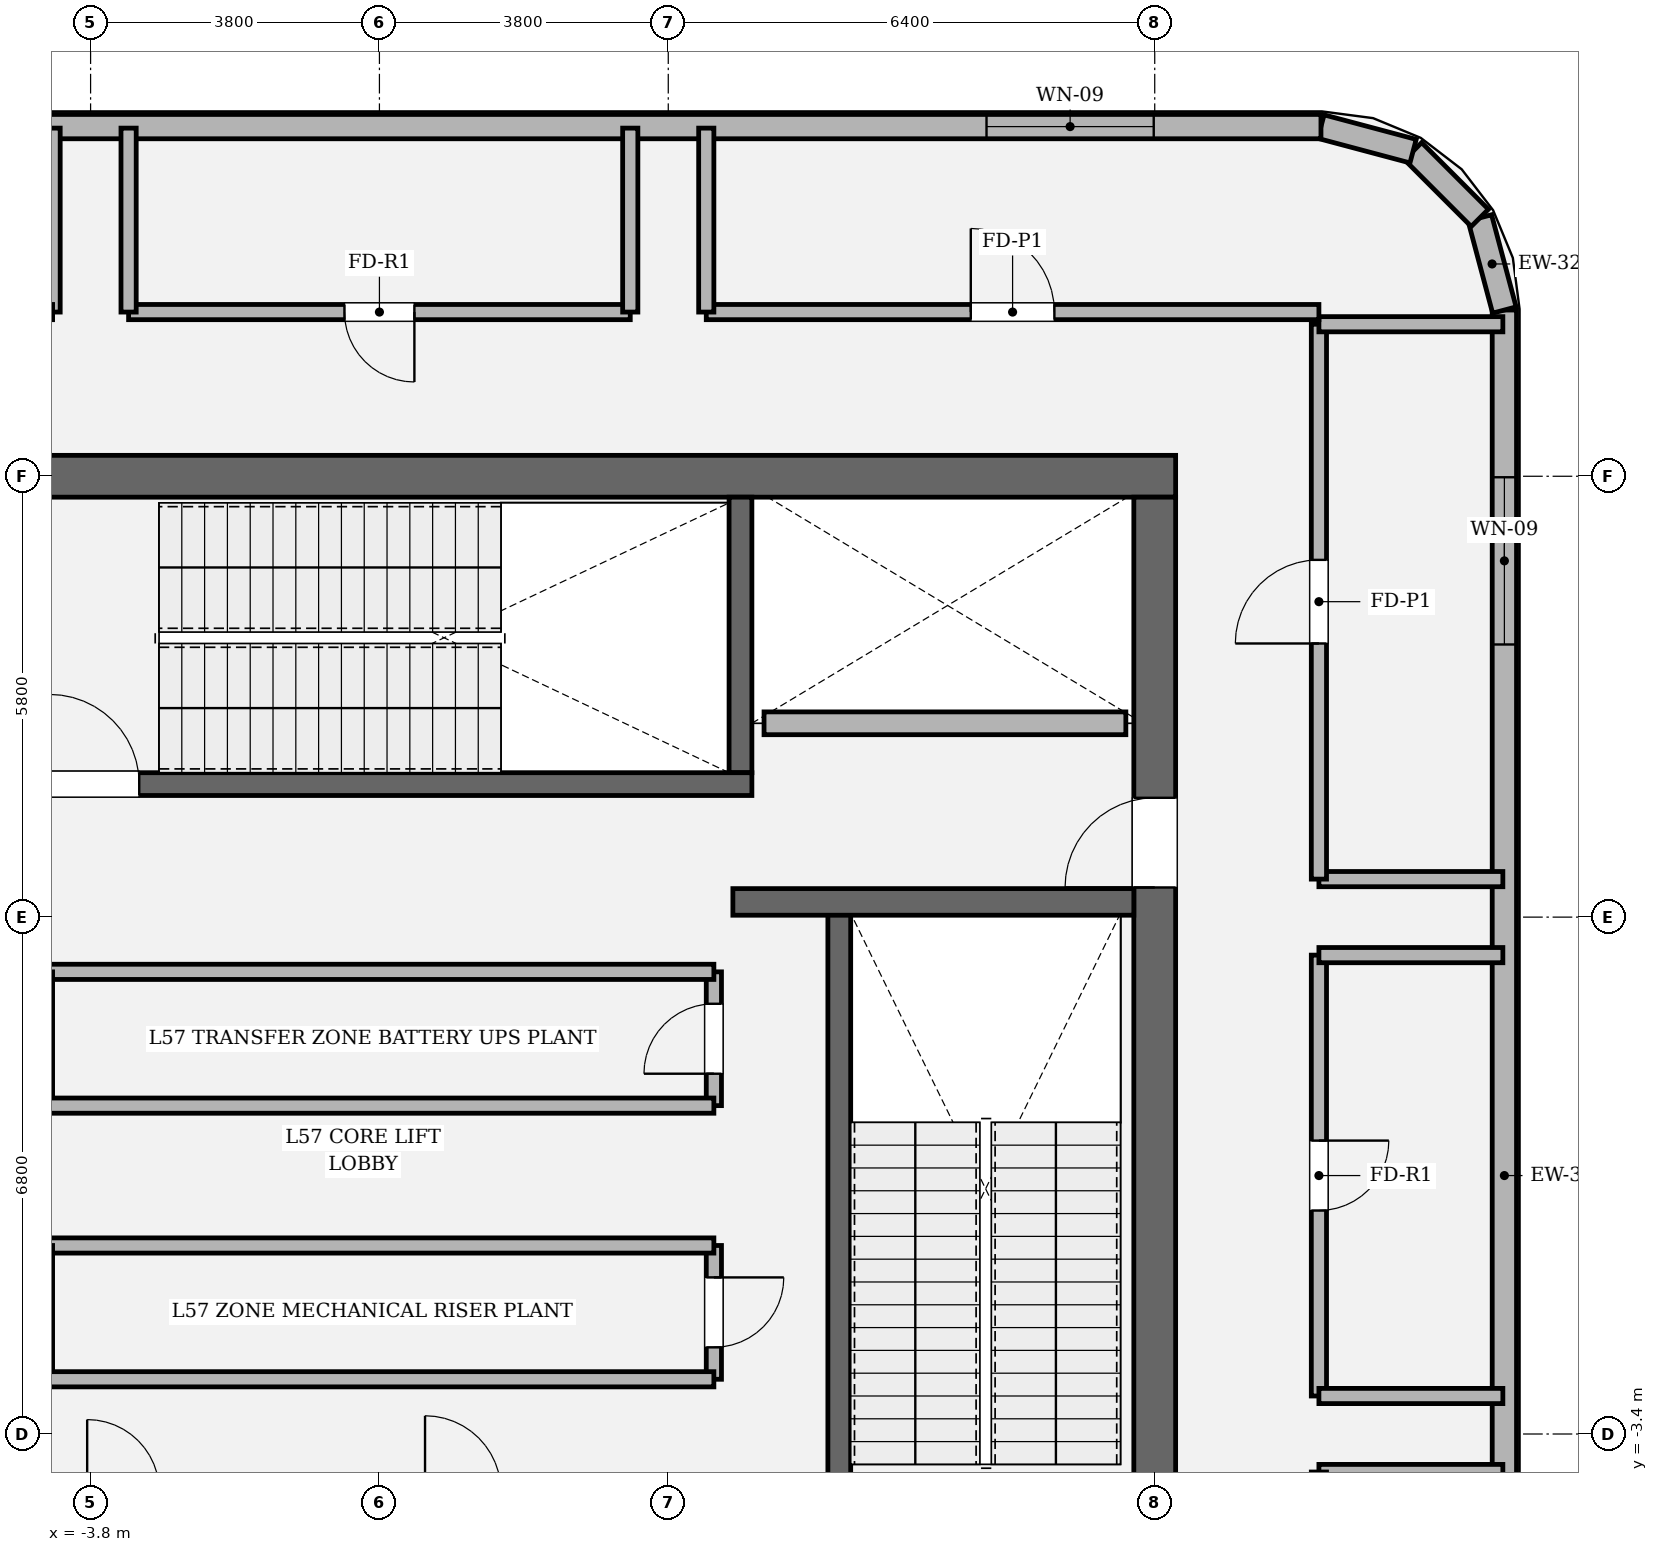
"""IFC4 building model, lengths in metres.
Left out: names, types, materials, properties, quantities, classifications, styles, units other than length and angle.
Written with IfcOpenShell. Run it as: python <this file> out.ifc"""

import sys

from ifc_helpers import new_model, si_unit, direction, frame, frame_2d, origin, place, context, subcontext, project, spatial, rectangle, extrude, element, fill, save


model = new_model("IFC4")
c1 = context("Model", 3, precision=1e-05, world=origin(), true_north=direction((0.0, 1.0)))
c2 = subcontext(c1, "Body", "Model", "MODEL_VIEW")
j1 = project(units=[si_unit("LENGTHUNIT", "METRE"), si_unit("PLANEANGLEUNIT", "RADIAN")], contexts=[c1])
p1 = place(None, origin())
s1 = spatial("IfcSite", under=j1, at=p1, CompositionType="ELEMENT")
p2 = place(p1, origin())
s2 = spatial("IfcBuilding", under=s1, at=p2, CompositionType="ELEMENT")
p3 = place(p2, frame((0.0, 0.0, 241.8)))
s3 = spatial("IfcBuildingStorey", under=s2, at=p3, CompositionType="ELEMENT", Elevation=241.8)
p4 = place(p3, frame((-10.475, 9.2, 0.0), z_axis=(0.0, 0.0, 1.0), x_axis=(1.0, 0.0, 0.0)))
e1 = element("IfcWall", 1, at=p4, inside=s3, PredefinedType="SHEAR", context=c2, shape_type="SweptSolid", body=[
    extrude(rectangle(XDim=20.95, YDim=0.55, at=frame_2d((10.475, 0.0))), origin(), (0.0, 0.0, 1.0), 4.8),
])
p5 = place(p3, frame((10.2, 8.925, 0.0), z_axis=(0.0, 0.0, 1.0), x_axis=(0.0, -1.0, 0.0)))
e2 = element("IfcWall", 2, at=p5, inside=s3, PredefinedType="SHEAR", context=c2, shape_type="SweptSolid", body=[
    extrude(rectangle(XDim=17.85, YDim=0.55, at=frame_2d((8.925, 0.0))), origin(), (0.0, 0.0, 1.0), 4.8),
])
p6 = place(p5, frame((3.955, 0.0, 0.0)))
e3 = element("IfcOpeningElement", 3, at=p6, cuts=e2, PredefinedType="OPENING", context=c2, shape_type="SweptSolid", body=[
    extrude(rectangle(XDim=1.18, YDim=2.2, at=frame_2d((0.59, 1.1))), frame((0.0, 0.285, 0.0), z_axis=(0.0, -1.0, 0.0), x_axis=(1.0, 0.0, 0.0)), (0.0, 0.0, 1.0), 0.57),
])
p7 = place(p3, frame((6.05, 3.45, 0.0), z_axis=(0.0, 0.0, 1.0), x_axis=(0.0, -1.0, 0.0)))
e4 = element("IfcWall", 4, at=p7, inside=s3, PredefinedType="SOLIDWALL", context=c2, shape_type="SweptSolid", body=[
    extrude(rectangle(XDim=8.95, YDim=0.3, at=frame_2d((4.475, 0.0))), origin(), (0.0, 0.0, 1.0), 4.8),
])
p8 = place(p3, frame((4.75, 8.925, 0.0), z_axis=(0.0, 0.0, 1.0), x_axis=(0.0, -1.0, 0.0)))
e5 = element("IfcWall", 5, at=p8, inside=s3, PredefinedType="SOLIDWALL", context=c2, shape_type="SweptSolid", body=[
    extrude(rectangle(XDim=3.625, YDim=0.3, at=frame_2d((1.812, 0.0))), origin(), (0.0, 0.0, 1.0), 4.8),
])
p9 = place(p3, frame((-4.9, 5.15, 0.0), z_axis=(0.0, 0.0, 1.0), x_axis=(1.0, 0.0, 0.0)))
e6 = element("IfcWall", 6, at=p9, inside=s3, PredefinedType="SOLIDWALL", context=c2, shape_type="SweptSolid", body=[
    extrude(rectangle(XDim=9.8, YDim=0.3, at=frame_2d((4.9, 0.0))), origin(), (0.0, 0.0, 1.0), 4.8),
])
p10 = place(p9, frame((0.56, 0.0, 0.0)))
e7 = element("IfcOpeningElement", 7, at=p10, cuts=e6, PredefinedType="OPENING", context=c2, shape_type="SweptSolid", body=[
    extrude(rectangle(XDim=1.18, YDim=2.2, at=frame_2d((0.59, 1.1))), frame((0.0, 0.16, 0.0), z_axis=(0.0, -1.0, 0.0), x_axis=(1.0, 0.0, 0.0)), (0.0, 0.0, 1.0), 0.32),
])
p11 = place(p3, frame((4.65, 3.6, 0.0), z_axis=(0.0, 0.0, 1.0), x_axis=(1.0, 0.0, 0.0)))
e8 = element("IfcWall", 8, at=p11, inside=s3, PredefinedType="SOLIDWALL", context=c2, shape_type="SweptSolid", body=[
    extrude(rectangle(XDim=5.275, YDim=0.35, at=frame_2d((2.638, 0.0))), origin(), (0.0, 0.0, 1.0), 4.8),
])
p12 = place(p3, frame((14.8, -11.387, 0.0), z_axis=(0.0, 0.0, 1.0), x_axis=(0.0, 1.0, 0.0)))
e9 = element("IfcWall", 9, at=p12, inside=s3, PredefinedType="SOLIDWALL", context=c2, shape_type="SweptSolid", body=[
    extrude(rectangle(XDim=22.774, YDim=0.32, at=frame_2d((11.387, 0.0))), origin(), (0.0, 0.0, 1.0), 3.884),
])
p13 = place(p12, frame((2.2, 0.0, 0.9)))
e10 = element("IfcOpeningElement", 10, at=p13, cuts=e9, PredefinedType="OPENING", context=c2, shape_type="SweptSolid", body=[
    extrude(rectangle(XDim=2.2, YDim=1.2, at=frame_2d((1.1, 0.6))), frame((0.0, 0.17, 0.0), z_axis=(0.0, -1.0, 0.0), x_axis=(1.0, 0.0, 0.0)), (0.0, 0.0, 1.0), 0.34),
])
p14 = place(p12, frame((18.374, 0.0, 0.9)))
e11 = element("IfcOpeningElement", 11, at=p14, cuts=e9, PredefinedType="OPENING", context=c2, shape_type="SweptSolid", body=[
    extrude(rectangle(XDim=2.2, YDim=1.2, at=frame_2d((1.1, 0.6))), frame((0.0, 0.17, 0.0), z_axis=(0.0, -1.0, 0.0), x_axis=(1.0, 0.0, 0.0)), (0.0, 0.0, 1.0), 0.34),
])
p15 = place(p3, frame((14.8, 11.387, 0.0), z_axis=(0.0, 0.0, 1.0), x_axis=(-0.25748094776, 0.966283375382, 0.0)))
e12 = element("IfcWall", 12, at=p15, inside=s3, PredefinedType="SOLIDWALL", context=c2, shape_type="SweptSolid", body=[
    extrude(rectangle(XDim=1.254, YDim=0.32, at=frame_2d((0.627, 0.0))), origin(), (0.0, 0.0, 1.0), 4.034),
])
p16 = place(p3, frame((14.477, 12.599, 0.0), z_axis=(0.0, 0.0, 1.0), x_axis=(-0.707106781187, 0.707106781187, 0.0)))
e13 = element("IfcWall", 13, at=p16, inside=s3, PredefinedType="SOLIDWALL", context=c2, shape_type="SweptSolid", body=[
    extrude(rectangle(XDim=1.242, YDim=0.32, at=frame_2d((0.621, 0.0))), origin(), (0.0, 0.0, 1.0), 4.034),
])
p17 = place(p3, frame((13.599, 13.477, 0.0), z_axis=(0.0, 0.0, 1.0), x_axis=(-0.966283375382, 0.25748094776, 0.0)))
e14 = element("IfcWall", 14, at=p17, inside=s3, PredefinedType="SOLIDWALL", context=c2, shape_type="SweptSolid", body=[
    extrude(rectangle(XDim=1.254, YDim=0.32, at=frame_2d((0.627, 0.0))), origin(), (0.0, 0.0, 1.0), 4.034),
])
p18 = place(p3, frame((12.387, 13.8, 0.0), z_axis=(0.0, 0.0, 1.0), x_axis=(-1.0, 0.0, 0.0)))
e15 = element("IfcWall", 15, at=p18, inside=s3, PredefinedType="SOLIDWALL", context=c2, shape_type="SweptSolid", body=[
    extrude(rectangle(XDim=24.774, YDim=0.32, at=frame_2d((12.387, 0.0))), origin(), (0.0, 0.0, 1.0), 3.884),
])
p19 = place(p18, frame((2.2, 0.0, 0.9)))
e16 = element("IfcOpeningElement", 16, at=p19, cuts=e15, PredefinedType="OPENING", context=c2, shape_type="SweptSolid", body=[
    extrude(rectangle(XDim=2.2, YDim=1.2, at=frame_2d((1.1, 0.6))), frame((0.0, 0.17, 0.0), z_axis=(0.0, -1.0, 0.0), x_axis=(1.0, 0.0, 0.0)), (0.0, 0.0, 1.0), 0.34),
])
p20 = place(p18, frame((20.374, 0.0, 0.9)))
e17 = element("IfcOpeningElement", 17, at=p20, cuts=e15, PredefinedType="OPENING", context=c2, shape_type="SweptSolid", body=[
    extrude(rectangle(XDim=2.2, YDim=1.2, at=frame_2d((1.1, 0.6))), frame((0.0, 0.17, 0.0), z_axis=(0.0, -1.0, 0.0), x_axis=(1.0, 0.0, 0.0)), (0.0, 0.0, 1.0), 0.34),
])
p21 = place(p3, frame((5.06, 5.95, 0.0), z_axis=(0.0, 0.0, 1.0), x_axis=(1.0, 0.0, 0.0)))
e18 = element("IfcWall", 18, at=p21, inside=s3, PredefinedType="SOLIDWALL", context=c2, shape_type="SweptSolid", body=[
    extrude(rectangle(XDim=4.76, YDim=0.3, at=frame_2d((2.38, 0.0))), origin(), (0.0, 0.0, 1.0), 4.54),
])
p22 = place(p3, frame((4.4, -2.68, 0.0), z_axis=(0.0, 0.0, 1.0), x_axis=(0.0, 1.0, 0.0)))
e19 = element("IfcWall", 19, at=p22, inside=s3, PredefinedType="SOLIDWALL", context=c2, shape_type="SweptSolid", body=[
    extrude(rectangle(XDim=1.76, YDim=0.2, at=frame_2d((0.88, 0.0))), origin(), (0.0, 0.0, 1.0), 4.54),
])
p23 = place(p22, frame((0.42, 0.0, 0.0)))
e20 = element("IfcOpeningElement", 20, at=p23, cuts=e19, PredefinedType="OPENING", context=c2, shape_type="SweptSolid", body=[
    extrude(rectangle(XDim=0.92, YDim=2.1, at=frame_2d((0.46, 1.05))), frame((0.0, 0.11, 0.0), z_axis=(0.0, -1.0, 0.0), x_axis=(1.0, 0.0, 0.0)), (0.0, 0.0, 1.0), 0.22),
])
p24 = place(p3, frame((4.4, -0.92, 0.0), z_axis=(0.0, 0.0, 1.0), x_axis=(-1.0, 0.0, 0.0)))
e21 = element("IfcWall", 21, at=p24, inside=s3, PredefinedType="SOLIDWALL", context=c2, shape_type="SweptSolid", body=[
    extrude(rectangle(XDim=8.8, YDim=0.2, at=frame_2d((4.4, 0.0))), origin(), (0.0, 0.0, 1.0), 4.54),
])
p25 = place(p3, frame((-4.4, -0.92, 0.0), z_axis=(0.0, 0.0, 1.0), x_axis=(0.0, -1.0, 0.0)))
e22 = element("IfcWall", 22, at=p25, inside=s3, PredefinedType="SOLIDWALL", context=c2, shape_type="SweptSolid", body=[
    extrude(rectangle(XDim=1.76, YDim=0.2, at=frame_2d((0.88, 0.0))), origin(), (0.0, 0.0, 1.0), 4.54),
])
p26 = place(p3, frame((-4.4, -2.68, 0.0), z_axis=(0.0, 0.0, 1.0), x_axis=(1.0, 0.0, 0.0)))
e23 = element("IfcWall", 23, at=p26, inside=s3, PredefinedType="SOLIDWALL", context=c2, shape_type="SweptSolid", body=[
    extrude(rectangle(XDim=8.8, YDim=0.2, at=frame_2d((4.4, 0.0))), origin(), (0.0, 0.0, 1.0), 4.54),
])
p27 = place(p3, frame((4.4, 0.92, 0.0), z_axis=(0.0, 0.0, 1.0), x_axis=(0.0, 1.0, 0.0)))
e24 = element("IfcWall", 24, at=p27, inside=s3, PredefinedType="SOLIDWALL", context=c2, shape_type="SweptSolid", body=[
    extrude(rectangle(XDim=1.76, YDim=0.2, at=frame_2d((0.88, 0.0))), origin(), (0.0, 0.0, 1.0), 4.54),
])
p28 = place(p27, frame((0.42, 0.0, 0.0)))
e25 = element("IfcOpeningElement", 25, at=p28, cuts=e24, PredefinedType="OPENING", context=c2, shape_type="SweptSolid", body=[
    extrude(rectangle(XDim=0.92, YDim=2.1, at=frame_2d((0.46, 1.05))), frame((0.0, 0.11, 0.0), z_axis=(0.0, -1.0, 0.0), x_axis=(1.0, 0.0, 0.0)), (0.0, 0.0, 1.0), 0.22),
])
p29 = place(p3, frame((4.4, 2.68, 0.0), z_axis=(0.0, 0.0, 1.0), x_axis=(-1.0, 0.0, 0.0)))
e26 = element("IfcWall", 26, at=p29, inside=s3, PredefinedType="SOLIDWALL", context=c2, shape_type="SweptSolid", body=[
    extrude(rectangle(XDim=8.8, YDim=0.2, at=frame_2d((4.4, 0.0))), origin(), (0.0, 0.0, 1.0), 4.54),
])
p30 = place(p3, frame((-4.4, 2.68, 0.0), z_axis=(0.0, 0.0, 1.0), x_axis=(0.0, -1.0, 0.0)))
e27 = element("IfcWall", 27, at=p30, inside=s3, PredefinedType="SOLIDWALL", context=c2, shape_type="SweptSolid", body=[
    extrude(rectangle(XDim=1.76, YDim=0.2, at=frame_2d((0.88, 0.0))), origin(), (0.0, 0.0, 1.0), 4.54),
])
p31 = place(p3, frame((-4.4, 0.92, 0.0), z_axis=(0.0, 0.0, 1.0), x_axis=(1.0, 0.0, 0.0)))
e28 = element("IfcWall", 28, at=p31, inside=s3, PredefinedType="SOLIDWALL", context=c2, shape_type="SweptSolid", body=[
    extrude(rectangle(XDim=8.8, YDim=0.2, at=frame_2d((4.4, 0.0))), origin(), (0.0, 0.0, 1.0), 4.54),
])
p32 = place(p3, frame((12.36, -3.9, 0.0), z_axis=(0.0, 0.0, 1.0), x_axis=(1.0, 0.0, 0.0)))
e29 = element("IfcWall", 29, at=p32, inside=s3, PredefinedType="SOLIDWALL", context=c2, shape_type="SweptSolid", body=[
    extrude(rectangle(XDim=2.42, YDim=0.2, at=frame_2d((1.21, 0.0))), origin(), (0.0, 0.0, 1.0), 4.034),
])
p33 = place(p3, frame((12.36, -2.9, 0.0), z_axis=(0.0, 0.0, 1.0), x_axis=(0.0, 1.0, 0.0)))
e30 = element("IfcWall", 30, at=p33, inside=s3, PredefinedType="SOLIDWALL", context=c2, shape_type="SweptSolid", body=[
    extrude(rectangle(XDim=5.8, YDim=0.2, at=frame_2d((2.9, 0.0))), origin(), (0.0, 0.0, 1.0), 4.54),
])
p34 = place(p33, frame((2.44, 0.0, 0.0)))
e31 = element("IfcOpeningElement", 31, at=p34, cuts=e30, PredefinedType="OPENING", context=c2, shape_type="SweptSolid", body=[
    extrude(rectangle(XDim=0.92, YDim=2.1, at=frame_2d((0.46, 1.05))), frame((0.0, 0.11, 0.0), z_axis=(0.0, -1.0, 0.0), x_axis=(1.0, 0.0, 0.0)), (0.0, 0.0, 1.0), 0.22),
])
for number, where, z_axis, x_axis in (
    (32, (12.36, 2.9, 0.0), (0.0, 0.0, 1.0), (1.0, 0.0, 0.0)),
    (33, (14.78, -2.9, 0.0), (0.0, 0.0, 1.0), (-1.0, 0.0, 0.0)),
    (34, (14.78, 3.9, 0.0), (0.0, 0.0, 1.0), (-1.0, 0.0, 0.0)),
):
    element("IfcWall", number, at=place(p3, frame(where, z_axis=z_axis, x_axis=x_axis)), inside=s3, PredefinedType="SOLIDWALL", context=c2, shape_type="SweptSolid", body=[
        extrude(rectangle(XDim=2.42, YDim=0.2, at=frame_2d((1.21, 0.0))), origin(), (0.0, 0.0, 1.0), 4.034),
    ])
p35 = place(p3, frame((12.36, 3.9, 0.0), z_axis=(0.0, 0.0, 1.0), x_axis=(0.0, 1.0, 0.0)))
e35 = element("IfcWall", 35, at=p35, inside=s3, PredefinedType="SOLIDWALL", context=c2, shape_type="SweptSolid", body=[
    extrude(rectangle(XDim=7.3, YDim=0.2, at=frame_2d((3.65, 0.0))), origin(), (0.0, 0.0, 1.0), 4.54),
])
p36 = place(p35, frame((3.1, 0.0, 0.0)))
e36 = element("IfcOpeningElement", 36, at=p36, cuts=e35, PredefinedType="OPENING", context=c2, shape_type="SweptSolid", body=[
    extrude(rectangle(XDim=1.1, YDim=2.2, at=frame_2d((0.55, 1.1))), frame((0.0, 0.11, 0.0), z_axis=(0.0, -1.0, 0.0), x_axis=(1.0, 0.0, 0.0)), (0.0, 0.0, 1.0), 0.22),
])
for number, where, z_axis, x_axis in (
    (37, (12.36, 11.2, 0.0), (0.0, 0.0, 1.0), (1.0, 0.0, 0.0)),
    (38, (-4.3, 13.78, 0.0), (0.0, 0.0, 1.0), (0.0, -1.0, 0.0)),
):
    element("IfcWall", number, at=place(p3, frame(where, z_axis=z_axis, x_axis=x_axis)), inside=s3, PredefinedType="SOLIDWALL", context=c2, shape_type="SweptSolid", body=[
        extrude(rectangle(XDim=2.42, YDim=0.2, at=frame_2d((1.21, 0.0))), origin(), (0.0, 0.0, 1.0), 4.034),
    ])
p37 = place(p3, frame((3.3, 11.36, 0.0), z_axis=(0.0, 0.0, 1.0), x_axis=(-1.0, 0.0, 0.0)))
e39 = element("IfcWall", 39, at=p37, inside=s3, PredefinedType="SOLIDWALL", context=c2, shape_type="SweptSolid", body=[
    extrude(rectangle(XDim=6.6, YDim=0.2, at=frame_2d((3.3, 0.0))), origin(), (0.0, 0.0, 1.0), 4.54),
])
p38 = place(p37, frame((2.84, 0.0, 0.0)))
e40 = element("IfcOpeningElement", 40, at=p38, cuts=e39, PredefinedType="OPENING", context=c2, shape_type="SweptSolid", body=[
    extrude(rectangle(XDim=0.92, YDim=2.1, at=frame_2d((0.46, 1.05))), frame((0.0, 0.11, 0.0), z_axis=(0.0, -1.0, 0.0), x_axis=(1.0, 0.0, 0.0)), (0.0, 0.0, 1.0), 0.22),
])
for number, where, z_axis, x_axis in (
    (41, (-3.3, 11.36, 0.0), (0.0, 0.0, 1.0), (0.0, 1.0, 0.0)),
    (42, (3.3, 13.78, 0.0), (0.0, 0.0, 1.0), (0.0, -1.0, 0.0)),
):
    element("IfcWall", number, at=place(p3, frame(where, z_axis=z_axis, x_axis=x_axis)), inside=s3, PredefinedType="SOLIDWALL", context=c2, shape_type="SweptSolid", body=[
        extrude(rectangle(XDim=2.42, YDim=0.2, at=frame_2d((1.21, 0.0))), origin(), (0.0, 0.0, 1.0), 4.034),
    ])
p39 = place(p3, frame((12.36, 11.36, 0.0), z_axis=(0.0, 0.0, 1.0), x_axis=(-1.0, 0.0, 0.0)))
e43 = element("IfcWall", 43, at=p39, inside=s3, PredefinedType="SOLIDWALL", context=c2, shape_type="SweptSolid", body=[
    extrude(rectangle(XDim=8.06, YDim=0.2, at=frame_2d((4.03, 0.0))), origin(), (0.0, 0.0, 1.0), 4.54),
])
p40 = place(p39, frame((3.48, 0.0, 0.0)))
e44 = element("IfcOpeningElement", 44, at=p40, cuts=e43, PredefinedType="OPENING", context=c2, shape_type="SweptSolid", body=[
    extrude(rectangle(XDim=1.1, YDim=2.2, at=frame_2d((0.55, 1.1))), frame((0.0, 0.11, 0.0), z_axis=(0.0, -1.0, 0.0), x_axis=(1.0, 0.0, 0.0)), (0.0, 0.0, 1.0), 0.22),
])
p41 = place(p3, frame((4.3, 11.36, 0.0), z_axis=(0.0, 0.0, 1.0), x_axis=(0.0, 1.0, 0.0)))
e45 = element("IfcWall", 45, at=p41, inside=s3, PredefinedType="SOLIDWALL", context=c2, shape_type="SweptSolid", body=[
    extrude(rectangle(XDim=2.42, YDim=0.2, at=frame_2d((1.21, 0.0))), origin(), (0.0, 0.0, 1.0), 4.034),
])
p42 = place(p14, origin())
e46 = element("IfcWindow", 46, at=p42, inside=s3, PartitioningType="SINGLE_PANEL", PredefinedType="WINDOW", context=c2, shape_type="SweptSolid", body=[
    extrude(rectangle(XDim=2.2, YDim=1.2, at=frame_2d((1.1, 0.6))), frame((0.0, 0.03, 0.0), z_axis=(0.0, -1.0, 0.0), x_axis=(1.0, 0.0, 0.0)), (0.0, 0.0, 1.0), 0.06),
])
fill(e11, e46)
p43 = place(p19, origin())
e47 = element("IfcWindow", 47, at=p43, inside=s3, PartitioningType="SINGLE_PANEL", PredefinedType="WINDOW", context=c2, shape_type="SweptSolid", body=[
    extrude(rectangle(XDim=2.2, YDim=1.2, at=frame_2d((1.1, 0.6))), frame((0.0, 0.03, 0.0), z_axis=(0.0, -1.0, 0.0), x_axis=(1.0, 0.0, 0.0)), (0.0, 0.0, 1.0), 0.06),
])
fill(e16, e47)
p44 = place(p10, origin())
e48 = element("IfcDoor", 48, at=p44, inside=s3, OperationType="SINGLE_SWING_LEFT", PredefinedType="DOOR", context=c2, shape_type="SweptSolid", body=[
    extrude(rectangle(XDim=1.18, YDim=2.2, at=frame_2d((0.59, 1.1))), frame((0.0, 0.025, 0.0), z_axis=(0.0, -1.0, 0.0), x_axis=(1.0, 0.0, 0.0)), (0.0, 0.0, 1.0), 0.05),
])
fill(e7, e48)
p45 = place(p6, origin())
e49 = element("IfcDoor", 49, at=p45, inside=s3, OperationType="SINGLE_SWING_RIGHT", PredefinedType="DOOR", context=c2, shape_type="SweptSolid", body=[
    extrude(rectangle(XDim=1.18, YDim=2.2, at=frame_2d((0.59, 1.1))), frame((0.0, 0.025, 0.0), z_axis=(0.0, -1.0, 0.0), x_axis=(1.0, 0.0, 0.0)), (0.0, 0.0, 1.0), 0.05),
])
fill(e3, e49)
p46 = place(p23, origin())
e50 = element("IfcDoor", 50, at=p46, inside=s3, OperationType="SINGLE_SWING_RIGHT", PredefinedType="DOOR", context=c2, shape_type="SweptSolid", body=[
    extrude(rectangle(XDim=0.92, YDim=2.1, at=frame_2d((0.46, 1.05))), frame((0.0, 0.025, 0.0), z_axis=(0.0, -1.0, 0.0), x_axis=(1.0, 0.0, 0.0)), (0.0, 0.0, 1.0), 0.05),
])
fill(e20, e50)
p47 = place(p28, origin())
e51 = element("IfcDoor", 51, at=p47, inside=s3, OperationType="SINGLE_SWING_LEFT", PredefinedType="DOOR", context=c2, shape_type="SweptSolid", body=[
    extrude(rectangle(XDim=0.92, YDim=2.1, at=frame_2d((0.46, 1.05))), frame((0.0, 0.025, 0.0), z_axis=(0.0, -1.0, 0.0), x_axis=(1.0, 0.0, 0.0)), (0.0, 0.0, 1.0), 0.05),
])
fill(e25, e51)
p48 = place(p34, origin())
e52 = element("IfcDoor", 52, at=p48, inside=s3, OperationType="SINGLE_SWING_RIGHT", PredefinedType="DOOR", context=c2, shape_type="SweptSolid", body=[
    extrude(rectangle(XDim=0.92, YDim=2.1, at=frame_2d((0.46, 1.05))), frame((0.0, 0.025, 0.0), z_axis=(0.0, -1.0, 0.0), x_axis=(1.0, 0.0, 0.0)), (0.0, 0.0, 1.0), 0.05),
])
fill(e31, e52)
p49 = place(p36, origin())
e53 = element("IfcDoor", 53, at=p49, inside=s3, OperationType="SINGLE_SWING_LEFT", PredefinedType="DOOR", context=c2, shape_type="SweptSolid", body=[
    extrude(rectangle(XDim=1.1, YDim=2.2, at=frame_2d((0.55, 1.1))), frame((0.0, 0.025, 0.0), z_axis=(0.0, -1.0, 0.0), x_axis=(1.0, 0.0, 0.0)), (0.0, 0.0, 1.0), 0.05),
])
fill(e36, e53)
p50 = place(p38, origin())
e54 = element("IfcDoor", 54, at=p50, inside=s3, OperationType="SINGLE_SWING_LEFT", PredefinedType="DOOR", context=c2, shape_type="SweptSolid", body=[
    extrude(rectangle(XDim=0.92, YDim=2.1, at=frame_2d((0.46, 1.05))), frame((0.0, 0.025, 0.0), z_axis=(0.0, -1.0, 0.0), x_axis=(1.0, 0.0, 0.0)), (0.0, 0.0, 1.0), 0.05),
])
fill(e40, e54)
p51 = place(p40, origin())
e55 = element("IfcDoor", 55, at=p51, inside=s3, OperationType="SINGLE_SWING_RIGHT", PredefinedType="DOOR", context=c2, shape_type="SweptSolid", body=[
    extrude(rectangle(XDim=1.1, YDim=2.2, at=frame_2d((0.55, 1.1))), frame((0.0, 0.025, 0.0), z_axis=(0.0, -1.0, 0.0), x_axis=(1.0, 0.0, 0.0)), (0.0, 0.0, 1.0), 0.05),
])
fill(e44, e55)
save(model, sys.argv[1])
